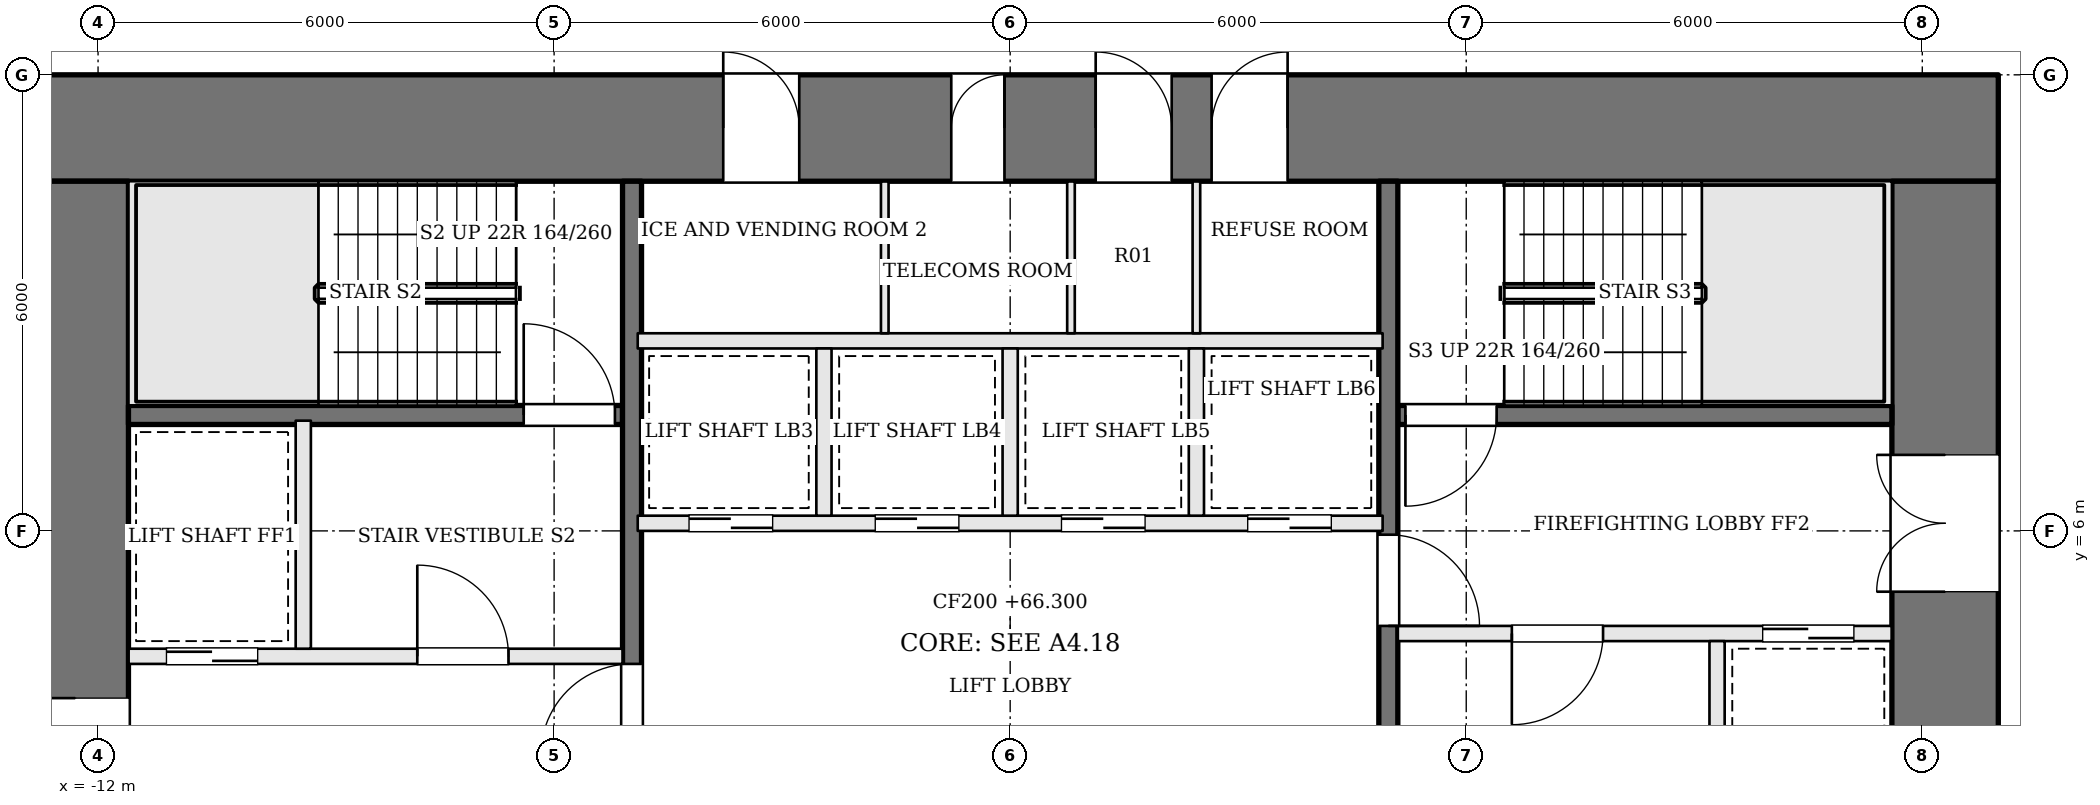
"""IFC4 building model, lengths in metres.
Left out: names, types, materials, properties, quantities, classifications, styles, units other than length and angle.
Written with IfcOpenShell. Run it as: python <this file> out.ifc"""

import sys

from ifc_helpers import new_model, si_unit, direction, frame, frame_2d, origin, place, context, subcontext, project, spatial, rectangle, extrude, element, fill, save


model = new_model("IFC4")
c1 = context("Model", 3, precision=1e-05, world=origin(), true_north=direction((0.0, 1.0)))
c2 = subcontext(c1, "Body", "Model", "MODEL_VIEW")
j1 = project(units=[si_unit("LENGTHUNIT", "METRE"), si_unit("PLANEANGLEUNIT", "RADIAN")], contexts=[c1])
p1 = place(None, origin())
s1 = spatial("IfcSite", under=j1, at=p1, CompositionType="ELEMENT")
p2 = place(p1, origin())
s2 = spatial("IfcBuilding", under=s1, at=p2, CompositionType="ELEMENT")
p3 = place(p2, frame((0.0, 0.0, 66.3)))
s3 = spatial("IfcBuildingStorey", under=s2, at=p3, CompositionType="ELEMENT", Elevation=66.3)
p4 = place(p3, frame((-13.0, 11.3, 0.0), z_axis=(0.0, 0.0, 1.0), x_axis=(1.0, 0.0, 0.0)))
e1 = element("IfcWall", 1, at=p4, inside=s3, PredefinedType="SHEAR", context=c2, shape_type="SweptSolid", body=[
    extrude(rectangle(XDim=26.0, YDim=1.4, at=frame_2d((13.0, 0.0))), origin(), (0.0, 0.0, 1.0), 3.6),
])
p5 = place(p4, frame((9.225, 0.0, 0.0)))
e2 = element("IfcOpeningElement", 2, at=p5, cuts=e1, PredefinedType="OPENING", context=c2, shape_type="SweptSolid", body=[
    extrude(rectangle(XDim=1.0, YDim=2.1, at=frame_2d((0.5, 1.05))), frame((0.0, 0.71, 0.0), z_axis=(0.0, -1.0, 0.0), x_axis=(1.0, 0.0, 0.0)), (0.0, 0.0, 1.0), 1.42),
])
p6 = place(p4, frame((12.225, 0.0, 0.0)))
e3 = element("IfcOpeningElement", 3, at=p6, cuts=e1, PredefinedType="OPENING", context=c2, shape_type="SweptSolid", body=[
    extrude(rectangle(XDim=0.7, YDim=2.1, at=frame_2d((0.35, 1.05))), frame((0.0, 0.71, 0.0), z_axis=(0.0, -1.0, 0.0), x_axis=(1.0, 0.0, 0.0)), (0.0, 0.0, 1.0), 1.42),
])
p7 = place(p4, frame((14.125, 0.0, 0.0)))
e4 = element("IfcOpeningElement", 4, at=p7, cuts=e1, PredefinedType="OPENING", context=c2, shape_type="SweptSolid", body=[
    extrude(rectangle(XDim=1.0, YDim=2.1, at=frame_2d((0.5, 1.05))), frame((0.0, 0.71, 0.0), z_axis=(0.0, -1.0, 0.0), x_axis=(1.0, 0.0, 0.0)), (0.0, 0.0, 1.0), 1.42),
])
p8 = place(p4, frame((15.65, 0.0, 0.0)))
e5 = element("IfcOpeningElement", 5, at=p8, cuts=e1, PredefinedType="OPENING", context=c2, shape_type="SweptSolid", body=[
    extrude(rectangle(XDim=1.0, YDim=2.1, at=frame_2d((0.5, 1.05))), frame((0.0, 0.71, 0.0), z_axis=(0.0, -1.0, 0.0), x_axis=(1.0, 0.0, 0.0)), (0.0, 0.0, 1.0), 1.42),
])
p9 = place(p3, frame((12.3, -1.6, 0.0), z_axis=(0.0, 0.0, 1.0), x_axis=(0.0, 1.0, 0.0)))
e6 = element("IfcWall", 6, at=p9, inside=s3, PredefinedType="SHEAR", context=c2, shape_type="SweptSolid", body=[
    extrude(rectangle(XDim=12.2, YDim=1.4, at=frame_2d((6.1, 0.0))), origin(), (0.0, 0.0, 1.0), 3.6),
])
p10 = place(p9, frame((6.8, 0.0, 0.0)))
e7 = element("IfcOpeningElement", 7, at=p10, cuts=e6, PredefinedType="OPENING", context=c2, shape_type="SweptSolid", body=[
    extrude(rectangle(XDim=1.8, YDim=2.1, at=frame_2d((0.9, 1.05))), frame((0.0, 0.71, 0.0), z_axis=(0.0, -1.0, 0.0), x_axis=(1.0, 0.0, 0.0)), (0.0, 0.0, 1.0), 1.42),
])
p11 = place(p3, frame((-12.3, -1.6, 0.0), z_axis=(0.0, 0.0, 1.0), x_axis=(0.0, 1.0, 0.0)))
e8 = element("IfcWall", 8, at=p11, inside=s3, PredefinedType="SHEAR", context=c2, shape_type="SweptSolid", body=[
    extrude(rectangle(XDim=12.2, YDim=1.4, at=frame_2d((6.1, 0.0))), origin(), (0.0, 0.0, 1.0), 3.6),
])
p12 = place(p11, frame((3.6, 0.0, 0.0)))
e9 = element("IfcOpeningElement", 9, at=p12, cuts=e8, PredefinedType="OPENING", context=c2, shape_type="SweptSolid", body=[
    extrude(rectangle(XDim=1.8, YDim=2.1, at=frame_2d((0.9, 1.05))), frame((0.0, 0.71, 0.0), z_axis=(0.0, -1.0, 0.0), x_axis=(1.0, 0.0, 0.0)), (0.0, 0.0, 1.0), 1.42),
])
p13 = place(p3, frame((11.6, 7.525, 0.0), z_axis=(0.0, 0.0, 1.0), x_axis=(-1.0, 0.0, 0.0)))
e10 = element("IfcWall", 10, at=p13, inside=s3, PredefinedType="SOLIDWALL", context=c2, shape_type="SweptSolid", body=[
    extrude(rectangle(XDim=6.5, YDim=0.25, at=frame_2d((3.25, 0.0))), origin(), (0.0, 0.0, 1.0), 3.4),
])
p14 = place(p13, frame((5.2, 0.0, 0.0)))
e11 = element("IfcOpeningElement", 11, at=p14, cuts=e10, PredefinedType="OPENING", context=c2, shape_type="SweptSolid", body=[
    extrude(rectangle(XDim=1.2, YDim=2.1, at=frame_2d((0.6, 1.05))), frame((0.0, 0.135, 0.0), z_axis=(0.0, -1.0, 0.0), x_axis=(1.0, 0.0, 0.0)), (0.0, 0.0, 1.0), 0.27),
])
p15 = place(p3, frame((-11.6, 4.35, 0.0), z_axis=(0.0, 0.0, 1.0), x_axis=(1.0, 0.0, 0.0)))
e12 = element("IfcWall", 12, at=p15, inside=s3, PredefinedType="SOLIDWALL", context=c2, shape_type="SweptSolid", body=[
    extrude(rectangle(XDim=6.5, YDim=0.2, at=frame_2d((3.25, 0.0))), origin(), (0.0, 0.0, 1.0), 3.4),
])
p16 = place(p15, frame((3.8, 0.0, 0.0)))
e13 = element("IfcOpeningElement", 13, at=p16, cuts=e12, PredefinedType="OPENING", context=c2, shape_type="SweptSolid", body=[
    extrude(rectangle(XDim=1.2, YDim=2.1, at=frame_2d((0.6, 1.05))), frame((0.0, 0.11, 0.0), z_axis=(0.0, -1.0, 0.0), x_axis=(1.0, 0.0, 0.0)), (0.0, 0.0, 1.0), 0.22),
])
p17 = place(p15, frame((0.5, 0.0, 0.0)))
e14 = element("IfcOpeningElement", 14, at=p17, cuts=e12, PredefinedType="OPENING", context=c2, shape_type="SweptSolid", body=[
    extrude(rectangle(XDim=1.2, YDim=2.1, at=frame_2d((0.6, 1.05))), frame((0.0, 0.11, 0.0), z_axis=(0.0, -1.0, 0.0), x_axis=(1.0, 0.0, 0.0)), (0.0, 0.0, 1.0), 0.22),
])
p18 = place(p3, frame((11.6, 4.65, 0.0), z_axis=(0.0, 0.0, 1.0), x_axis=(-1.0, 0.0, 0.0)))
e15 = element("IfcWall", 15, at=p18, inside=s3, PredefinedType="SOLIDWALL", context=c2, shape_type="SweptSolid", body=[
    extrude(rectangle(XDim=6.5, YDim=0.2, at=frame_2d((3.25, 0.0))), origin(), (0.0, 0.0, 1.0), 3.4),
])
p19 = place(p18, frame((3.8, 0.0, 0.0)))
e16 = element("IfcOpeningElement", 16, at=p19, cuts=e15, PredefinedType="OPENING", context=c2, shape_type="SweptSolid", body=[
    extrude(rectangle(XDim=1.2, YDim=2.1, at=frame_2d((0.6, 1.05))), frame((0.0, 0.11, 0.0), z_axis=(0.0, -1.0, 0.0), x_axis=(1.0, 0.0, 0.0)), (0.0, 0.0, 1.0), 0.22),
])
p20 = place(p18, frame((0.5, 0.0, 0.0)))
e17 = element("IfcOpeningElement", 17, at=p20, cuts=e15, PredefinedType="OPENING", context=c2, shape_type="SweptSolid", body=[
    extrude(rectangle(XDim=1.2, YDim=2.1, at=frame_2d((0.6, 1.05))), frame((0.0, 0.11, 0.0), z_axis=(0.0, -1.0, 0.0), x_axis=(1.0, 0.0, 0.0)), (0.0, 0.0, 1.0), 0.22),
])
p21 = place(p3, frame((-11.6, 7.525, 0.0), z_axis=(0.0, 0.0, 1.0), x_axis=(1.0, 0.0, 0.0)))
e18 = element("IfcWall", 18, at=p21, inside=s3, PredefinedType="SOLIDWALL", context=c2, shape_type="SweptSolid", body=[
    extrude(rectangle(XDim=6.5, YDim=0.25, at=frame_2d((3.25, 0.0))), origin(), (0.0, 0.0, 1.0), 3.4),
])
p22 = place(p21, frame((5.2, 0.0, 0.0)))
e19 = element("IfcOpeningElement", 19, at=p22, cuts=e18, PredefinedType="OPENING", context=c2, shape_type="SweptSolid", body=[
    extrude(rectangle(XDim=1.2, YDim=2.1, at=frame_2d((0.6, 1.05))), frame((0.0, 0.135, 0.0), z_axis=(0.0, -1.0, 0.0), x_axis=(1.0, 0.0, 0.0)), (0.0, 0.0, 1.0), 0.27),
])
for number, where, z_axis, x_axis in (
    (20, (-9.3, 4.45, 0.0), (0.0, 0.0, 1.0), (0.0, 1.0, 0.0)),
    (21, (9.3, 4.55, 0.0), (0.0, 0.0, 1.0), (0.0, -1.0, 0.0)),
):
    element("IfcWall", number, at=place(p3, frame(where, z_axis=z_axis, x_axis=x_axis)), inside=s3, PredefinedType="SOLIDWALL", context=c2, shape_type="SweptSolid", body=[
        extrude(rectangle(XDim=3.0, YDim=0.2, at=frame_2d((1.5, 0.0))), origin(), (0.0, 0.0, 1.0), 3.4),
    ])
p23 = place(p3, frame((-4.975, -1.6, 0.0), z_axis=(0.0, 0.0, 1.0), x_axis=(0.0, 1.0, 0.0)))
e22 = element("IfcWall", 22, at=p23, inside=s3, PredefinedType="SOLIDWALL", context=c2, shape_type="SweptSolid", body=[
    extrude(rectangle(XDim=12.2, YDim=0.25, at=frame_2d((6.1, 0.0))), origin(), (0.0, 0.0, 1.0), 3.4),
])
p24 = place(p23, frame((4.65, 0.0, 0.0)))
e23 = element("IfcOpeningElement", 23, at=p24, cuts=e22, PredefinedType="OPENING", context=c2, shape_type="SweptSolid", body=[
    extrude(rectangle(XDim=1.2, YDim=2.1, at=frame_2d((0.6, 1.05))), frame((0.0, 0.135, 0.0), z_axis=(0.0, -1.0, 0.0), x_axis=(1.0, 0.0, 0.0)), (0.0, 0.0, 1.0), 0.27),
])
p25 = place(p3, frame((4.975, 10.6, 0.0), z_axis=(0.0, 0.0, 1.0), x_axis=(0.0, -1.0, 0.0)))
e24 = element("IfcWall", 24, at=p25, inside=s3, PredefinedType="SOLIDWALL", context=c2, shape_type="SweptSolid", body=[
    extrude(rectangle(XDim=12.2, YDim=0.25, at=frame_2d((6.1, 0.0))), origin(), (0.0, 0.0, 1.0), 3.4),
])
p26 = place(p25, frame((4.65, 0.0, 0.0)))
e25 = element("IfcOpeningElement", 25, at=p26, cuts=e24, PredefinedType="OPENING", context=c2, shape_type="SweptSolid", body=[
    extrude(rectangle(XDim=1.2, YDim=2.1, at=frame_2d((0.6, 1.05))), frame((0.0, 0.135, 0.0), z_axis=(0.0, -1.0, 0.0), x_axis=(1.0, 0.0, 0.0)), (0.0, 0.0, 1.0), 0.27),
])
p27 = place(p3, frame((-4.9, 6.1, 0.0), z_axis=(0.0, 0.0, 1.0), x_axis=(1.0, 0.0, 0.0)))
e26 = element("IfcWall", 26, at=p27, inside=s3, PredefinedType="SOLIDWALL", context=c2, shape_type="SweptSolid", body=[
    extrude(rectangle(XDim=9.8, YDim=0.2, at=frame_2d((4.9, 0.0))), origin(), (0.0, 0.0, 1.0), 3.4),
])
p28 = place(p27, frame((0.675, 0.0, 0.0)))
e27 = element("IfcOpeningElement", 27, at=p28, cuts=e26, PredefinedType="OPENING", context=c2, shape_type="SweptSolid", body=[
    extrude(rectangle(XDim=1.1, YDim=2.1, at=frame_2d((0.55, 1.05))), frame((0.0, 0.11, 0.0), z_axis=(0.0, -1.0, 0.0), x_axis=(1.0, 0.0, 0.0)), (0.0, 0.0, 1.0), 0.22),
])
p29 = place(p27, frame((3.125, 0.0, 0.0)))
e28 = element("IfcOpeningElement", 28, at=p29, cuts=e26, PredefinedType="OPENING", context=c2, shape_type="SweptSolid", body=[
    extrude(rectangle(XDim=1.1, YDim=2.1, at=frame_2d((0.55, 1.05))), frame((0.0, 0.11, 0.0), z_axis=(0.0, -1.0, 0.0), x_axis=(1.0, 0.0, 0.0)), (0.0, 0.0, 1.0), 0.22),
])
p30 = place(p27, frame((5.575, 0.0, 0.0)))
e29 = element("IfcOpeningElement", 29, at=p30, cuts=e26, PredefinedType="OPENING", context=c2, shape_type="SweptSolid", body=[
    extrude(rectangle(XDim=1.1, YDim=2.1, at=frame_2d((0.55, 1.05))), frame((0.0, 0.11, 0.0), z_axis=(0.0, -1.0, 0.0), x_axis=(1.0, 0.0, 0.0)), (0.0, 0.0, 1.0), 0.22),
])
p31 = place(p27, frame((8.025, 0.0, 0.0)))
e30 = element("IfcOpeningElement", 30, at=p31, cuts=e26, PredefinedType="OPENING", context=c2, shape_type="SweptSolid", body=[
    extrude(rectangle(XDim=1.1, YDim=2.1, at=frame_2d((0.55, 1.05))), frame((0.0, 0.11, 0.0), z_axis=(0.0, -1.0, 0.0), x_axis=(1.0, 0.0, 0.0)), (0.0, 0.0, 1.0), 0.22),
])
p32 = place(p3, frame((-4.9, 8.5, 0.0), z_axis=(0.0, 0.0, 1.0), x_axis=(1.0, 0.0, 0.0)))
e31 = element("IfcWall", 31, at=p32, inside=s3, PredefinedType="SOLIDWALL", context=c2, shape_type="SweptSolid", body=[
    extrude(rectangle(XDim=9.8, YDim=0.2, at=frame_2d((4.9, 0.0))), origin(), (0.0, 0.0, 1.0), 3.4),
])
for number, where, z_axis, x_axis in (
    (32, (-2.45, 6.2, 0.0), (0.0, 0.0, 1.0), (0.0, 1.0, 0.0)),
    (33, (0.0, 6.2, 0.0), (0.0, 0.0, 1.0), (0.0, 1.0, 0.0)),
    (34, (2.45, 6.2, 0.0), (0.0, 0.0, 1.0), (0.0, 1.0, 0.0)),
):
    element("IfcWall", number, at=place(p3, frame(where, z_axis=z_axis, x_axis=x_axis)), inside=s3, PredefinedType="SOLIDWALL", context=c2, shape_type="SweptSolid", body=[
        extrude(rectangle(XDim=2.2, YDim=0.2, at=frame_2d((1.1, 0.0))), origin(), (0.0, 0.0, 1.0), 3.4),
    ])
for number, where, z_axis, x_axis in (
    (35, (-1.65, 8.6, 0.0), (0.0, 0.0, 1.0), (0.0, 1.0, 0.0)),
    (36, (0.8, 8.6, 0.0), (0.0, 0.0, 1.0), (0.0, 1.0, 0.0)),
    (37, (2.45, 8.6, 0.0), (0.0, 0.0, 1.0), (0.0, 1.0, 0.0)),
):
    element("IfcWall", number, at=place(p3, frame(where, z_axis=z_axis, x_axis=x_axis)), inside=s3, PredefinedType="PARTITIONING", context=c2, shape_type="SweptSolid", body=[
        extrude(rectangle(XDim=2.0, YDim=0.1, at=frame_2d((1.0, 0.0))), origin(), (0.0, 0.0, 1.0), 3.4),
    ])
p33 = place(p12, origin())
e38 = element("IfcDoor", 38, at=p33, inside=s3, OperationType="DOUBLE_DOOR_SINGLE_SWING", PredefinedType="DOOR", context=c2, shape_type="SweptSolid", body=[
    extrude(rectangle(XDim=1.8, YDim=2.1, at=frame_2d((0.9, 1.05))), frame((0.0, 0.025, 0.0), z_axis=(0.0, -1.0, 0.0), x_axis=(1.0, 0.0, 0.0)), (0.0, 0.0, 1.0), 0.05),
])
fill(e9, e38)
p34 = place(p10, origin())
e39 = element("IfcDoor", 39, at=p34, inside=s3, OperationType="DOUBLE_DOOR_SINGLE_SWING", PredefinedType="DOOR", context=c2, shape_type="SweptSolid", body=[
    extrude(rectangle(XDim=1.8, YDim=2.1, at=frame_2d((0.9, 1.05))), frame((0.0, 0.025, 0.0), z_axis=(0.0, -1.0, 0.0), x_axis=(1.0, 0.0, 0.0)), (0.0, 0.0, 1.0), 0.05),
])
fill(e7, e39)
p35 = place(p24, origin())
e40 = element("IfcDoor", 40, at=p35, inside=s3, OperationType="SINGLE_SWING_LEFT", PredefinedType="DOOR", context=c2, shape_type="SweptSolid", body=[
    extrude(rectangle(XDim=1.2, YDim=2.1, at=frame_2d((0.6, 1.05))), frame((0.0, 0.025, 0.0), z_axis=(0.0, -1.0, 0.0), x_axis=(1.0, 0.0, 0.0)), (0.0, 0.0, 1.0), 0.05),
])
fill(e23, e40)
p36 = place(p26, origin())
e41 = element("IfcDoor", 41, at=p36, inside=s3, OperationType="SINGLE_SWING_RIGHT", PredefinedType="DOOR", context=c2, shape_type="SweptSolid", body=[
    extrude(rectangle(XDim=1.2, YDim=2.1, at=frame_2d((0.6, 1.05))), frame((0.0, 0.025, 0.0), z_axis=(0.0, -1.0, 0.0), x_axis=(1.0, 0.0, 0.0)), (0.0, 0.0, 1.0), 0.05),
])
fill(e25, e41)
p37 = place(p16, origin())
e42 = element("IfcDoor", 42, at=p37, inside=s3, OperationType="SINGLE_SWING_LEFT", PredefinedType="DOOR", context=c2, shape_type="SweptSolid", body=[
    extrude(rectangle(XDim=1.2, YDim=2.1, at=frame_2d((0.6, 1.05))), frame((0.0, 0.025, 0.0), z_axis=(0.0, -1.0, 0.0), x_axis=(1.0, 0.0, 0.0)), (0.0, 0.0, 1.0), 0.05),
])
fill(e13, e42)
p38 = place(p19, origin())
e43 = element("IfcDoor", 43, at=p38, inside=s3, OperationType="SINGLE_SWING_RIGHT", PredefinedType="DOOR", context=c2, shape_type="SweptSolid", body=[
    extrude(rectangle(XDim=1.2, YDim=2.1, at=frame_2d((0.6, 1.05))), frame((0.0, 0.025, 0.0), z_axis=(0.0, -1.0, 0.0), x_axis=(1.0, 0.0, 0.0)), (0.0, 0.0, 1.0), 0.05),
])
fill(e16, e43)
p39 = place(p14, origin())
e44 = element("IfcDoor", 44, at=p39, inside=s3, OperationType="SINGLE_SWING_RIGHT", PredefinedType="DOOR", context=c2, shape_type="SweptSolid", body=[
    extrude(rectangle(XDim=1.2, YDim=2.1, at=frame_2d((0.6, 1.05))), frame((0.0, 0.025, 0.0), z_axis=(0.0, -1.0, 0.0), x_axis=(1.0, 0.0, 0.0)), (0.0, 0.0, 1.0), 0.05),
])
fill(e11, e44)
p40 = place(p22, origin())
e45 = element("IfcDoor", 45, at=p40, inside=s3, OperationType="SINGLE_SWING_LEFT", PredefinedType="DOOR", context=c2, shape_type="SweptSolid", body=[
    extrude(rectangle(XDim=1.2, YDim=2.1, at=frame_2d((0.6, 1.05))), frame((0.0, 0.025, 0.0), z_axis=(0.0, -1.0, 0.0), x_axis=(1.0, 0.0, 0.0)), (0.0, 0.0, 1.0), 0.05),
])
fill(e19, e45)
p41 = place(p17, origin())
e46 = element("IfcDoor", 46, at=p41, inside=s3, OperationType="SLIDING_TO_RIGHT", PredefinedType="DOOR", context=c2, shape_type="SweptSolid", body=[
    extrude(rectangle(XDim=1.2, YDim=2.1, at=frame_2d((0.6, 1.05))), frame((0.0, 0.025, 0.0), z_axis=(0.0, -1.0, 0.0), x_axis=(1.0, 0.0, 0.0)), (0.0, 0.0, 1.0), 0.05),
])
fill(e14, e46)
p42 = place(p20, origin())
e47 = element("IfcDoor", 47, at=p42, inside=s3, OperationType="SLIDING_TO_RIGHT", PredefinedType="DOOR", context=c2, shape_type="SweptSolid", body=[
    extrude(rectangle(XDim=1.2, YDim=2.1, at=frame_2d((0.6, 1.05))), frame((0.0, 0.025, 0.0), z_axis=(0.0, -1.0, 0.0), x_axis=(1.0, 0.0, 0.0)), (0.0, 0.0, 1.0), 0.05),
])
fill(e17, e47)
p43 = place(p28, origin())
e48 = element("IfcDoor", 48, at=p43, inside=s3, OperationType="SLIDING_TO_RIGHT", PredefinedType="DOOR", context=c2, shape_type="SweptSolid", body=[
    extrude(rectangle(XDim=1.1, YDim=2.1, at=frame_2d((0.55, 1.05))), frame((0.0, 0.025, 0.0), z_axis=(0.0, -1.0, 0.0), x_axis=(1.0, 0.0, 0.0)), (0.0, 0.0, 1.0), 0.05),
])
fill(e27, e48)
p44 = place(p29, origin())
e49 = element("IfcDoor", 49, at=p44, inside=s3, OperationType="SLIDING_TO_LEFT", PredefinedType="DOOR", context=c2, shape_type="SweptSolid", body=[
    extrude(rectangle(XDim=1.1, YDim=2.1, at=frame_2d((0.55, 1.05))), frame((0.0, 0.025, 0.0), z_axis=(0.0, -1.0, 0.0), x_axis=(1.0, 0.0, 0.0)), (0.0, 0.0, 1.0), 0.05),
])
fill(e28, e49)
p45 = place(p30, origin())
e50 = element("IfcDoor", 50, at=p45, inside=s3, OperationType="SLIDING_TO_RIGHT", PredefinedType="DOOR", context=c2, shape_type="SweptSolid", body=[
    extrude(rectangle(XDim=1.1, YDim=2.1, at=frame_2d((0.55, 1.05))), frame((0.0, 0.025, 0.0), z_axis=(0.0, -1.0, 0.0), x_axis=(1.0, 0.0, 0.0)), (0.0, 0.0, 1.0), 0.05),
])
fill(e29, e50)
p46 = place(p31, origin())
e51 = element("IfcDoor", 51, at=p46, inside=s3, OperationType="SLIDING_TO_LEFT", PredefinedType="DOOR", context=c2, shape_type="SweptSolid", body=[
    extrude(rectangle(XDim=1.1, YDim=2.1, at=frame_2d((0.55, 1.05))), frame((0.0, 0.025, 0.0), z_axis=(0.0, -1.0, 0.0), x_axis=(1.0, 0.0, 0.0)), (0.0, 0.0, 1.0), 0.05),
])
fill(e30, e51)
p47 = place(p5, origin())
e52 = element("IfcDoor", 52, at=p47, inside=s3, OperationType="SINGLE_SWING_LEFT", PredefinedType="DOOR", context=c2, shape_type="SweptSolid", body=[
    extrude(rectangle(XDim=1.0, YDim=2.1, at=frame_2d((0.5, 1.05))), frame((0.0, 0.025, 0.0), z_axis=(0.0, -1.0, 0.0), x_axis=(1.0, 0.0, 0.0)), (0.0, 0.0, 1.0), 0.05),
])
fill(e2, e52)
p48 = place(p6, origin())
e53 = element("IfcDoor", 53, at=p48, inside=s3, OperationType="SINGLE_SWING_RIGHT", PredefinedType="DOOR", context=c2, shape_type="SweptSolid", body=[
    extrude(rectangle(XDim=0.7, YDim=2.1, at=frame_2d((0.35, 1.05))), frame((0.0, 0.025, 0.0), z_axis=(0.0, -1.0, 0.0), x_axis=(1.0, 0.0, 0.0)), (0.0, 0.0, 1.0), 0.05),
])
fill(e3, e53)
p49 = place(p7, origin())
e54 = element("IfcDoor", 54, at=p49, inside=s3, OperationType="SINGLE_SWING_LEFT", PredefinedType="DOOR", context=c2, shape_type="SweptSolid", body=[
    extrude(rectangle(XDim=1.0, YDim=2.1, at=frame_2d((0.5, 1.05))), frame((0.0, 0.025, 0.0), z_axis=(0.0, -1.0, 0.0), x_axis=(1.0, 0.0, 0.0)), (0.0, 0.0, 1.0), 0.05),
])
fill(e4, e54)
p50 = place(p8, origin())
e55 = element("IfcDoor", 55, at=p50, inside=s3, OperationType="SINGLE_SWING_RIGHT", PredefinedType="DOOR", context=c2, shape_type="SweptSolid", body=[
    extrude(rectangle(XDim=1.0, YDim=2.1, at=frame_2d((0.5, 1.05))), frame((0.0, 0.025, 0.0), z_axis=(0.0, -1.0, 0.0), x_axis=(1.0, 0.0, 0.0)), (0.0, 0.0, 1.0), 0.05),
])
fill(e5, e55)
save(model, sys.argv[1])
